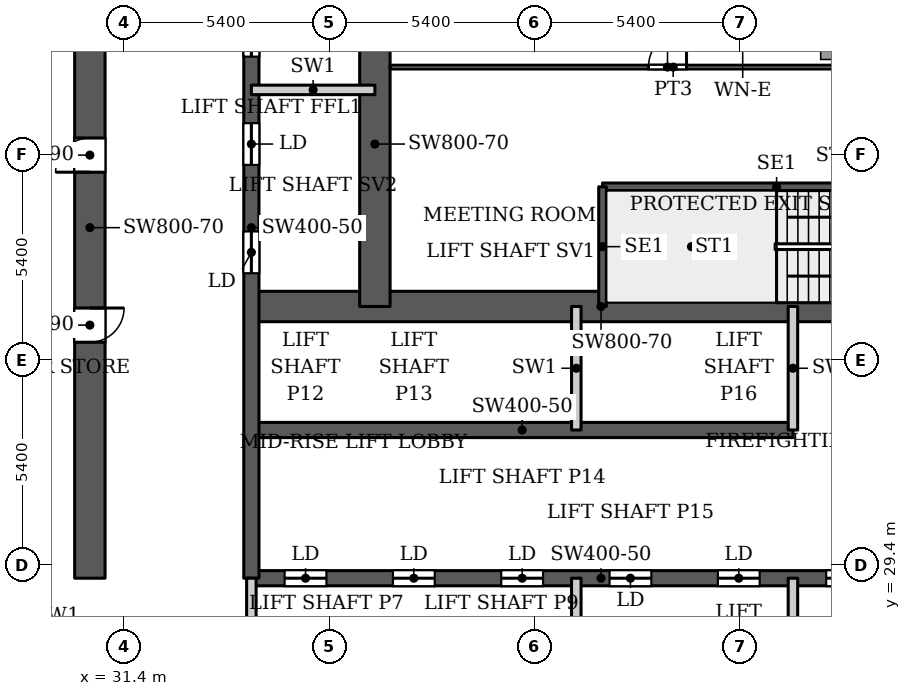
"""IFC4 building model, lengths in metres.
Left out: names, types, materials, properties, quantities, classifications, styles, units other than length and angle.
Written with IfcOpenShell. Run it as: python <this file> out.ifc"""

import sys

from ifc_helpers import new_model, si_unit, direction, frame, frame_2d, origin, place, context, subcontext, project, spatial, rectangle, extrude, source, transform, mapped, element, fill, save


model = new_model("IFC4")
c1 = context("Model", 3, precision=1e-05, world=origin(), true_north=direction((0.0, 1.0)))
c2 = subcontext(c1, "Body", "Model", "MODEL_VIEW")
j1 = project(units=[si_unit("LENGTHUNIT", "METRE"), si_unit("PLANEANGLEUNIT", "RADIAN")], contexts=[c1])
p1 = place(None, origin())
s1 = spatial("IfcSite", under=j1, at=p1, CompositionType="ELEMENT")
p2 = place(p1, origin())
s2 = spatial("IfcBuilding", under=s1, at=p2, CompositionType="ELEMENT")
p3 = place(p2, frame((0.0, 0.0, 183.8)))
s3 = spatial("IfcBuildingStorey", under=s2, at=p3, CompositionType="ELEMENT", Elevation=183.8)
p4 = place(p3, frame((34.75, 29.05, 0.0), z_axis=(0.0, 0.0, 1.0), x_axis=(1.0, 0.0, 0.0)))
e1 = element("IfcWall", 1, at=p4, inside=s3, PredefinedType="SHEAR", context=c2, shape_type="SweptSolid", body=[
    extrude(rectangle(XDim=18.4, YDim=0.4, at=frame_2d((9.2, 0.0))), origin(), (0.0, 0.0, 1.0), 3.9),
])
p5 = place(p4, frame((0.875, 0.0, 0.0)))
e2 = element("IfcOpeningElement", 2, at=p5, cuts=e1, PredefinedType="OPENING", context=c2, shape_type="SweptSolid", body=[
    extrude(rectangle(XDim=1.1, YDim=2.2, at=frame_2d((0.55, 1.1))), frame((0.0, 0.21, 0.0), z_axis=(0.0, -1.0, 0.0), x_axis=(1.0, 0.0, 0.0)), (0.0, 0.0, 1.0), 0.42),
])
p6 = place(p4, frame((3.725, 0.0, 0.0)))
e3 = element("IfcOpeningElement", 3, at=p6, cuts=e1, PredefinedType="OPENING", context=c2, shape_type="SweptSolid", body=[
    extrude(rectangle(XDim=1.1, YDim=2.2, at=frame_2d((0.55, 1.1))), frame((0.0, 0.21, 0.0), z_axis=(0.0, -1.0, 0.0), x_axis=(1.0, 0.0, 0.0)), (0.0, 0.0, 1.0), 0.42),
])
p7 = place(p4, frame((6.575, 0.0, 0.0)))
e4 = element("IfcOpeningElement", 4, at=p7, cuts=e1, PredefinedType="OPENING", context=c2, shape_type="SweptSolid", body=[
    extrude(rectangle(XDim=1.1, YDim=2.2, at=frame_2d((0.55, 1.1))), frame((0.0, 0.21, 0.0), z_axis=(0.0, -1.0, 0.0), x_axis=(1.0, 0.0, 0.0)), (0.0, 0.0, 1.0), 0.42),
])
p8 = place(p4, frame((9.425, 0.0, 0.0)))
e5 = element("IfcOpeningElement", 5, at=p8, cuts=e1, PredefinedType="OPENING", context=c2, shape_type="SweptSolid", body=[
    extrude(rectangle(XDim=1.1, YDim=2.2, at=frame_2d((0.55, 1.1))), frame((0.0, 0.21, 0.0), z_axis=(0.0, -1.0, 0.0), x_axis=(1.0, 0.0, 0.0)), (0.0, 0.0, 1.0), 0.42),
])
p9 = place(p4, frame((12.275, 0.0, 0.0)))
e6 = element("IfcOpeningElement", 6, at=p9, cuts=e1, PredefinedType="OPENING", context=c2, shape_type="SweptSolid", body=[
    extrude(rectangle(XDim=1.1, YDim=2.2, at=frame_2d((0.55, 1.1))), frame((0.0, 0.21, 0.0), z_axis=(0.0, -1.0, 0.0), x_axis=(1.0, 0.0, 0.0)), (0.0, 0.0, 1.0), 0.42),
])
p10 = place(p4, frame((15.125, 0.0, 0.0)))
e7 = element("IfcOpeningElement", 7, at=p10, cuts=e1, PredefinedType="OPENING", context=c2, shape_type="SweptSolid", body=[
    extrude(rectangle(XDim=1.1, YDim=2.2, at=frame_2d((0.55, 1.1))), frame((0.0, 0.21, 0.0), z_axis=(0.0, -1.0, 0.0), x_axis=(1.0, 0.0, 0.0)), (0.0, 0.0, 1.0), 0.42),
])
p11 = place(p3, frame((34.75, 32.95, 0.0), z_axis=(0.0, 0.0, 1.0), x_axis=(1.0, 0.0, 0.0)))
e8 = element("IfcWall", 8, at=p11, inside=s3, PredefinedType="SHEAR", context=c2, shape_type="SweptSolid", body=[
    extrude(rectangle(XDim=14.25, YDim=0.4, at=frame_2d((7.125, 0.0))), origin(), (0.0, 0.0, 1.0), 3.9),
])
p12 = place(p3, frame((34.75, 36.2, 0.0), z_axis=(0.0, 0.0, 1.0), x_axis=(1.0, 0.0, 0.0)))
e9 = element("IfcWall", 9, at=p12, inside=s3, PredefinedType="SHEAR", context=c2, shape_type="SweptSolid", body=[
    extrude(rectangle(XDim=18.4, YDim=0.8, at=frame_2d((9.2, 0.0))), origin(), (0.0, 0.0, 1.0), 3.9),
])
p13 = place(p12, frame((16.9, 0.0, 0.0)))
e10 = element("IfcOpeningElement", 10, at=p13, cuts=e9, PredefinedType="OPENING", context=c2, shape_type="SweptSolid", body=[
    extrude(rectangle(XDim=1.0, YDim=2.2, at=frame_2d((0.5, 1.1))), frame((0.0, 0.41, 0.0), z_axis=(0.0, -1.0, 0.0), x_axis=(1.0, 0.0, 0.0)), (0.0, 0.0, 1.0), 0.82),
])
p14 = place(p3, frame((34.75, 29.05, 0.0), z_axis=(0.0, 0.0, 1.0), x_axis=(0.0, 1.0, 0.0)))
e11 = element("IfcWall", 11, at=p14, inside=s3, PredefinedType="SHEAR", context=c2, shape_type="SweptSolid", body=[
    extrude(rectangle(XDim=18.45, YDim=0.4, at=frame_2d((9.225, 0.0))), origin(), (0.0, 0.0, 1.0), 3.9),
])
p15 = place(p14, frame((8.025, 0.0, 0.0)))
e12 = element("IfcOpeningElement", 12, at=p15, cuts=e11, PredefinedType="OPENING", context=c2, shape_type="SweptSolid", body=[
    extrude(rectangle(XDim=1.1, YDim=2.2, at=frame_2d((0.55, 1.1))), frame((0.0, 0.21, 0.0), z_axis=(0.0, -1.0, 0.0), x_axis=(1.0, 0.0, 0.0)), (0.0, 0.0, 1.0), 0.42),
])
p16 = place(p14, frame((10.875, 0.0, 0.0)))
e13 = element("IfcOpeningElement", 13, at=p16, cuts=e11, PredefinedType="OPENING", context=c2, shape_type="SweptSolid", body=[
    extrude(rectangle(XDim=1.1, YDim=2.2, at=frame_2d((0.55, 1.1))), frame((0.0, 0.21, 0.0), z_axis=(0.0, -1.0, 0.0), x_axis=(1.0, 0.0, 0.0)), (0.0, 0.0, 1.0), 0.42),
])
p17 = place(p14, frame((13.725, 0.0, 0.0)))
e14 = element("IfcOpeningElement", 14, at=p17, cuts=e11, PredefinedType="OPENING", context=c2, shape_type="SweptSolid", body=[
    extrude(rectangle(XDim=1.1, YDim=2.2, at=frame_2d((0.55, 1.1))), frame((0.0, 0.21, 0.0), z_axis=(0.0, -1.0, 0.0), x_axis=(1.0, 0.0, 0.0)), (0.0, 0.0, 1.0), 0.42),
])
p18 = place(p14, frame((15.95, 0.0, 0.0)))
e15 = element("IfcOpeningElement", 15, at=p18, cuts=e11, PredefinedType="OPENING", context=c2, shape_type="SweptSolid", body=[
    extrude(rectangle(XDim=1.1, YDim=2.2, at=frame_2d((0.55, 1.1))), frame((0.0, 0.21, 0.0), z_axis=(0.0, -1.0, 0.0), x_axis=(1.0, 0.0, 0.0)), (0.0, 0.0, 1.0), 0.42),
])
p19 = place(p3, frame((38.0, 36.2, 0.0), z_axis=(0.0, 0.0, 1.0), x_axis=(0.0, 1.0, 0.0)))
e16 = element("IfcWall", 16, at=p19, inside=s3, PredefinedType="SHEAR", context=c2, shape_type="SweptSolid", body=[
    extrude(rectangle(XDim=8.55, YDim=0.8, at=frame_2d((4.275, 0.0))), origin(), (0.0, 0.0, 1.0), 3.9),
])
p20 = place(p3, frame((30.5, 29.05, 0.0), z_axis=(0.0, 0.0, 1.0), x_axis=(0.0, 1.0, 0.0)))
e17 = element("IfcWall", 17, at=p20, inside=s3, PredefinedType="SHEAR", context=c2, shape_type="SweptSolid", body=[
    extrude(rectangle(XDim=18.45, YDim=0.8, at=frame_2d((9.225, 0.0))), origin(), (0.0, 0.0, 1.0), 3.9),
])
p21 = place(p20, frame((6.21, 0.0, 0.0)))
e18 = element("IfcOpeningElement", 18, at=p21, cuts=e17, PredefinedType="OPENING", context=c2, shape_type="SweptSolid", body=[
    extrude(rectangle(XDim=0.9, YDim=2.2, at=frame_2d((0.45, 1.1))), frame((0.0, 0.41, 0.0), z_axis=(0.0, -1.0, 0.0), x_axis=(1.0, 0.0, 0.0)), (0.0, 0.0, 1.0), 0.82),
])
p22 = place(p20, frame((10.684, 0.0, 0.0)))
e19 = element("IfcOpeningElement", 19, at=p22, cuts=e17, PredefinedType="OPENING", context=c2, shape_type="SweptSolid", body=[
    extrude(rectangle(XDim=0.9, YDim=2.2, at=frame_2d((0.45, 1.1))), frame((0.0, 0.41, 0.0), z_axis=(0.0, -1.0, 0.0), x_axis=(1.0, 0.0, 0.0)), (0.0, 0.0, 1.0), 0.82),
])
p23 = place(p3, frame((29.712, 26.072, 0.0), z_axis=(0.0, 0.0, 1.0), x_axis=(-0.511028049012, 0.859564036662, 0.0)))
e20 = element("IfcWall", 20, at=p23, inside=s3, PredefinedType="SOLIDWALL", context=c2, shape_type="SweptSolid", body=[
    extrude(rectangle(XDim=4.634, YDim=0.25, at=frame_2d((2.317, 0.0))), origin(), (0.0, 0.0, 1.0), 3.147),
])
p24 = place(p3, frame((27.195, 31.969, 0.0), z_axis=(0.0, 0.0, 1.0), x_axis=(0.052554995867, 0.998618031286, 0.0)))
e21 = element("IfcWall", 21, at=p24, inside=s3, PredefinedType="SOLIDWALL", context=c2, shape_type="SweptSolid", body=[
    extrude(rectangle(XDim=66.787, YDim=0.25, at=frame_2d((33.394, 0.0))), origin(), (0.0, 0.0, 1.0), 3.75),
])
p25 = place(p3, frame((43.99, 39.35, 0.0), z_axis=(0.0, 0.0, 1.0), x_axis=(1.0, 0.0, 0.0)))
e22 = element("IfcWall", 22, at=p25, inside=s3, PredefinedType="SHEAR", context=c2, shape_type="SweptSolid", body=[
    extrude(rectangle(XDim=9.16, YDim=0.2, at=frame_2d((4.58, 0.0))), origin(), (0.0, 0.0, 1.0), 3.9),
])
p26 = place(p3, frame((43.99, 36.2, 0.0), z_axis=(0.0, 0.0, 1.0), x_axis=(0.0, 1.0, 0.0)))
e23 = element("IfcWall", 23, at=p26, inside=s3, PredefinedType="SHEAR", context=c2, shape_type="SweptSolid", body=[
    extrude(rectangle(XDim=3.15, YDim=0.2, at=frame_2d((1.575, 0.0))), origin(), (0.0, 0.0, 1.0), 3.9),
])
for number, where, z_axis, x_axis in (
    (24, (34.75, 25.8, 0.0), (0.0, 0.0, 1.0), (0.0, 1.0, 0.0)),
    (25, (43.3, 25.8, 0.0), (0.0, 0.0, 1.0), (0.0, 1.0, 0.0)),
    (26, (43.3, 32.95, 0.0), (0.0, 0.0, 1.0), (0.0, 1.0, 0.0)),
    (27, (49.0, 25.8, 0.0), (0.0, 0.0, 1.0), (0.0, 1.0, 0.0)),
    (28, (49.0, 32.95, 0.0), (0.0, 0.0, 1.0), (0.0, 1.0, 0.0)),
    (29, (34.75, 41.9, 0.0), (0.0, 0.0, 1.0), (1.0, 0.0, 0.0)),
):
    element("IfcWall", number, at=place(p3, frame(where, z_axis=z_axis, x_axis=x_axis)), inside=s3, PredefinedType="PARTITIONING", context=c2, shape_type="SweptSolid", body=[
        extrude(rectangle(XDim=3.25, YDim=0.25, at=frame_2d((1.625, 0.0))), origin(), (0.0, 0.0, 1.0), 3.9),
    ])
p27 = place(p3, frame((38.399, 42.5, 0.0), z_axis=(0.0, 0.0, 1.0), x_axis=(1.0, 0.0, 0.0)))
e30 = element("IfcWall", 30, at=p27, inside=s3, PredefinedType="PARTITIONING", context=c2, shape_type="SweptSolid", body=[
    extrude(rectangle(XDim=14.901, YDim=0.1, at=frame_2d((7.451, 0.0))), origin(), (0.0, 0.0, 1.0), 3.6),
])
p28 = place(p27, frame((6.801, 0.0, 0.0)))
e31 = element("IfcOpeningElement", 31, at=p28, cuts=e30, PredefinedType="OPENING", context=c2, shape_type="SweptSolid", body=[
    extrude(rectangle(XDim=1.0, YDim=2.1, at=frame_2d((0.5, 1.05))), frame((0.0, 0.06, 0.0), z_axis=(0.0, -1.0, 0.0), x_axis=(1.0, 0.0, 0.0)), (0.0, 0.0, 1.0), 0.12),
])
m1 = source(origin(), c2, "Body", "SweptSolid", [
    extrude(rectangle(XDim=1.1, YDim=2.2, at=frame_2d((0.55, 1.1))), frame((0.0, 0.025, 0.0), z_axis=(0.0, -1.0, 0.0), x_axis=(1.0, 0.0, 0.0)), (0.0, 0.0, 1.0), 0.05),
])
p29 = place(p5, origin())
e32 = element("IfcDoor", 32, at=p29, inside=s3, OperationType="SLIDING_TO_LEFT", PredefinedType="DOOR", context=c2, shape_type="MappedRepresentation", body=[
    mapped(m1, transform((0.0, 0.0, 0.0), x_axis=(1.0, 0.0, 0.0), y_axis=(0.0, 1.0, 0.0), z_axis=(0.0, 0.0, 1.0), scale=1.0)),
])
fill(e2, e32)
p30 = place(p6, origin())
e33 = element("IfcDoor", 33, at=p30, inside=s3, OperationType="SLIDING_TO_LEFT", PredefinedType="DOOR", context=c2, shape_type="MappedRepresentation", body=[
    mapped(m1, transform((0.0, 0.0, 0.0), x_axis=(1.0, 0.0, 0.0), y_axis=(0.0, 1.0, 0.0), z_axis=(0.0, 0.0, 1.0), scale=1.0)),
])
fill(e3, e33)
p31 = place(p7, origin())
e34 = element("IfcDoor", 34, at=p31, inside=s3, OperationType="SLIDING_TO_LEFT", PredefinedType="DOOR", context=c2, shape_type="MappedRepresentation", body=[
    mapped(m1, transform((0.0, 0.0, 0.0), x_axis=(1.0, 0.0, 0.0), y_axis=(0.0, 1.0, 0.0), z_axis=(0.0, 0.0, 1.0), scale=1.0)),
])
fill(e4, e34)
p32 = place(p8, origin())
e35 = element("IfcDoor", 35, at=p32, inside=s3, OperationType="SLIDING_TO_LEFT", PredefinedType="DOOR", context=c2, shape_type="MappedRepresentation", body=[
    mapped(m1, transform((0.0, 0.0, 0.0), x_axis=(1.0, 0.0, 0.0), y_axis=(0.0, 1.0, 0.0), z_axis=(0.0, 0.0, 1.0), scale=1.0)),
])
fill(e5, e35)
p33 = place(p9, origin())
e36 = element("IfcDoor", 36, at=p33, inside=s3, OperationType="SLIDING_TO_LEFT", PredefinedType="DOOR", context=c2, shape_type="MappedRepresentation", body=[
    mapped(m1, transform((0.0, 0.0, 0.0), x_axis=(1.0, 0.0, 0.0), y_axis=(0.0, 1.0, 0.0), z_axis=(0.0, 0.0, 1.0), scale=1.0)),
])
fill(e6, e36)
p34 = place(p15, origin())
e37 = element("IfcDoor", 37, at=p34, inside=s3, OperationType="SLIDING_TO_LEFT", PredefinedType="DOOR", context=c2, shape_type="MappedRepresentation", body=[
    mapped(m1, transform((0.0, 0.0, 0.0), x_axis=(1.0, 0.0, 0.0), y_axis=(0.0, 1.0, 0.0), z_axis=(0.0, 0.0, 1.0), scale=1.0)),
])
fill(e12, e37)
p35 = place(p16, origin())
e38 = element("IfcDoor", 38, at=p35, inside=s3, OperationType="SLIDING_TO_LEFT", PredefinedType="DOOR", context=c2, shape_type="MappedRepresentation", body=[
    mapped(m1, transform((0.0, 0.0, 0.0), x_axis=(1.0, 0.0, 0.0), y_axis=(0.0, 1.0, 0.0), z_axis=(0.0, 0.0, 1.0), scale=1.0)),
])
fill(e13, e38)
p36 = place(p17, origin())
e39 = element("IfcDoor", 39, at=p36, inside=s3, OperationType="SLIDING_TO_LEFT", PredefinedType="DOOR", context=c2, shape_type="MappedRepresentation", body=[
    mapped(m1, transform((0.0, 0.0, 0.0), x_axis=(1.0, 0.0, 0.0), y_axis=(0.0, 1.0, 0.0), z_axis=(0.0, 0.0, 1.0), scale=1.0)),
])
fill(e14, e39)
p37 = place(p10, origin())
e40 = element("IfcDoor", 40, at=p37, inside=s3, OperationType="SLIDING_TO_LEFT", PredefinedType="DOOR", context=c2, shape_type="MappedRepresentation", body=[
    mapped(m1, transform((0.0, 0.0, 0.0), x_axis=(1.0, 0.0, 0.0), y_axis=(0.0, 1.0, 0.0), z_axis=(0.0, 0.0, 1.0), scale=1.0)),
])
fill(e7, e40)
m2 = source(origin(), c2, "Body", "SweptSolid", [
    extrude(rectangle(XDim=0.9, YDim=2.2, at=frame_2d((0.45, 1.1))), frame((0.0, 0.025, 0.0), z_axis=(0.0, -1.0, 0.0), x_axis=(1.0, 0.0, 0.0)), (0.0, 0.0, 1.0), 0.05),
])
p38 = place(p21, origin())
e41 = element("IfcDoor", 41, at=p38, inside=s3, OperationType="SINGLE_SWING_RIGHT", PredefinedType="DOOR", context=c2, shape_type="MappedRepresentation", body=[
    mapped(m2, transform((0.0, 0.0, 0.0), x_axis=(1.0, 0.0, 0.0), y_axis=(0.0, 1.0, 0.0), z_axis=(0.0, 0.0, 1.0), scale=1.0)),
])
fill(e18, e41)
p39 = place(p22, origin())
e42 = element("IfcDoor", 42, at=p39, inside=s3, OperationType="SINGLE_SWING_LEFT", PredefinedType="DOOR", context=c2, shape_type="MappedRepresentation", body=[
    mapped(m2, transform((0.0, 0.0, 0.0), x_axis=(1.0, 0.0, 0.0), y_axis=(0.0, 1.0, 0.0), z_axis=(0.0, 0.0, 1.0), scale=1.0)),
])
fill(e19, e42)
m3 = source(origin(), c2, "Body", "SweptSolid", [
    extrude(rectangle(XDim=1.0, YDim=2.1, at=frame_2d((0.5, 1.05))), frame((0.0, 0.025, 0.0), z_axis=(0.0, -1.0, 0.0), x_axis=(1.0, 0.0, 0.0)), (0.0, 0.0, 1.0), 0.05),
])
p40 = place(p28, origin())
e43 = element("IfcDoor", 43, at=p40, inside=s3, OperationType="SINGLE_SWING_LEFT", PredefinedType="DOOR", context=c2, shape_type="MappedRepresentation", body=[
    mapped(m3, transform((0.0, 0.0, 0.0), x_axis=(1.0, 0.0, 0.0), y_axis=(0.0, 1.0, 0.0), z_axis=(0.0, 0.0, 1.0), scale=1.0)),
])
fill(e31, e43)
save(model, sys.argv[1])
